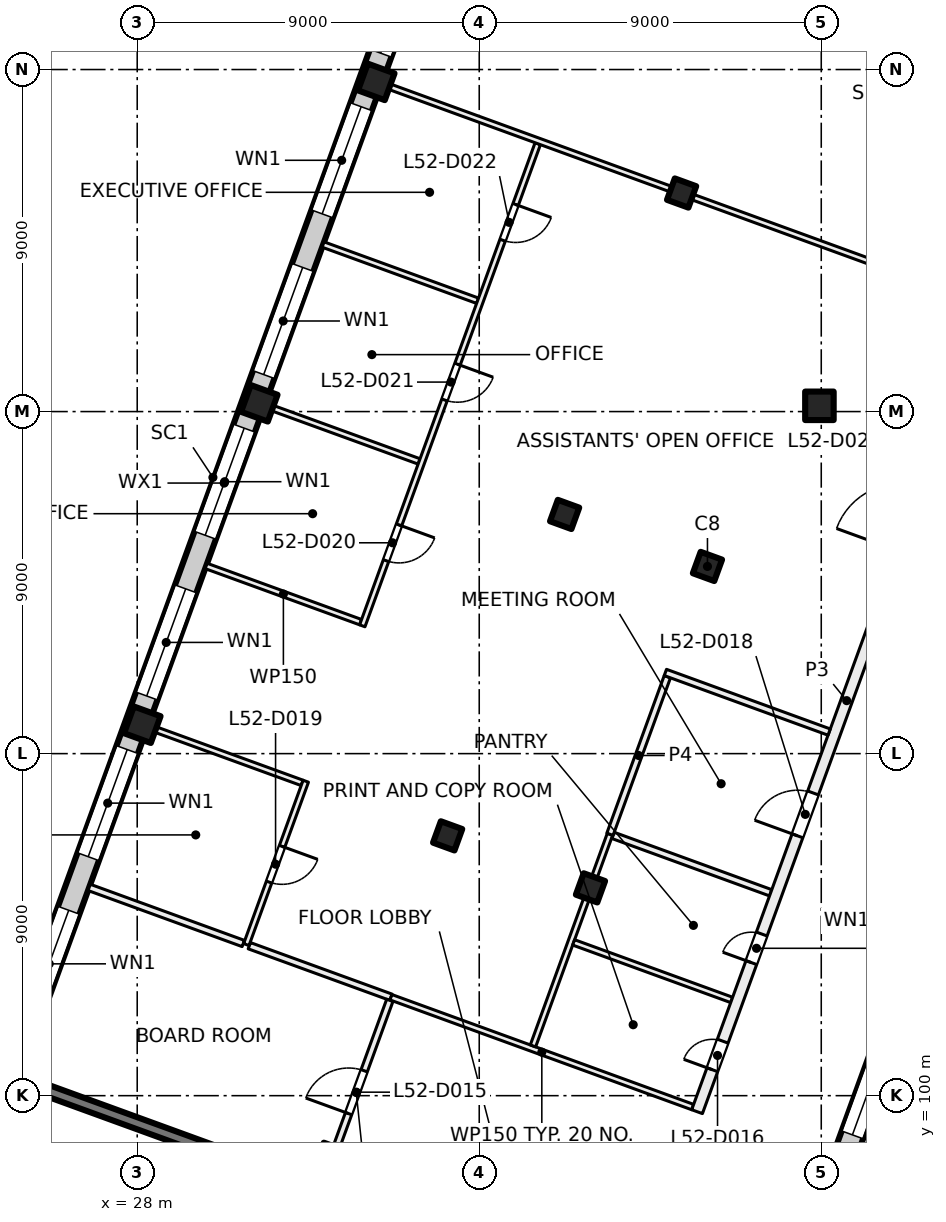
"""IFC4 building model, lengths in metres.
Left out: names, types, materials, properties, quantities, classifications, styles, units other than length and angle.
Written with IfcOpenShell. Run it as: python <this file> out.ifc"""

import sys

from ifc_helpers import new_model, si_unit, direction, frame, frame_2d, origin, origin_2d, place, context, subcontext, project, spatial, rectangle, extrude, element, fill, save


model = new_model("IFC4")
c1 = context("Model", 3, precision=1e-05, world=origin(), true_north=direction((0.0, 1.0)))
c2 = subcontext(c1, "Body", "Model", "MODEL_VIEW")
j1 = project(units=[si_unit("LENGTHUNIT", "METRE"), si_unit("PLANEANGLEUNIT", "RADIAN")], contexts=[c1])
p1 = place(None, origin())
s1 = spatial("IfcSite", under=j1, at=p1, CompositionType="ELEMENT")
p2 = place(p1, origin())
s2 = spatial("IfcBuilding", under=s1, at=p2, CompositionType="ELEMENT")
p3 = place(p2, frame((0.0, 0.0, 220.0)))
s3 = spatial("IfcBuildingStorey", under=s2, at=p3, CompositionType="ELEMENT", Elevation=220.0)
p4 = place(p3, frame((45.952, 118.152, 0.0), z_axis=(0.0, 0.0, 1.0), x_axis=(1.0, 0.0, 0.0)))
e1 = element("IfcColumn", 1, at=p4, inside=s3, PredefinedType="COLUMN", context=c2, shape_type="SweptSolid", body=[
    extrude(rectangle(XDim=0.75, YDim=0.75, at=origin_2d()), origin(), (0.0, 0.0, 1.0), 4.0),
])
for number, where, z_axis, x_axis in (
    (2, (43.006, 113.925, 0.0), (0.0, 0.0, 1.0), (-0.342, -0.94, 0.0)),
    (3, (39.927, 105.468, 0.0), (0.0, 0.0, 1.0), (-0.342, -0.94, 0.0)),
    (4, (42.325, 123.751, 0.0), (0.0, 0.0, 1.0), (-0.342, -0.94, 0.0)),
    (5, (39.247, 115.293, 0.0), (0.0, 0.0, 1.0), (-0.342, -0.94, 0.0)),
    (6, (36.169, 106.836, 0.0), (0.0, 0.0, 1.0), (-0.342, -0.94, 0.0)),
):
    element("IfcColumn", number, at=place(p3, frame(where, z_axis=z_axis, x_axis=x_axis)), inside=s3, PredefinedType="COLUMN", context=c2, shape_type="SweptSolid", body=[
        extrude(rectangle(XDim=0.6, YDim=0.6, at=origin_2d()), origin(), (0.0, 0.0, 1.0), 4.0),
    ])
for number, where, z_axis, x_axis in (
    (7, (34.291, 126.675, 0.0), (0.0, 0.0, 1.0), (-0.342, -0.94, 0.0)),
    (8, (31.212, 118.218, 0.0), (0.0, 0.0, 1.0), (-0.342, -0.94, 0.0)),
    (9, (28.134, 109.76, 0.0), (0.0, 0.0, 1.0), (-0.342, -0.94, 0.0)),
):
    element("IfcColumn", number, at=place(p3, frame(where, z_axis=z_axis, x_axis=x_axis)), inside=s3, PredefinedType="COLUMN", context=c2, shape_type="SweptSolid", body=[
        extrude(rectangle(XDim=0.75, YDim=0.75, at=origin_2d()), origin(), (0.0, 0.0, 1.0), 4.0),
    ])
p5 = place(p3, frame((32.971, 97.465, 0.0), z_axis=(0.0, 0.0, 1.0), x_axis=(-0.939695066972, 0.34201342241, 0.0)))
e10 = element("IfcWall", 10, at=p5, inside=s3, PredefinedType="SHEAR", context=c2, shape_type="SweptSolid", body=[
    extrude(rectangle(XDim=8.7, YDim=0.3, at=frame_2d((4.35, 0.0))), origin(), (0.0, 0.0, 1.0), 4.0),
])
p6 = place(p3, frame((52.212, 113.783, 0.0), z_axis=(0.0, 0.0, 1.0), x_axis=(-0.34202521188, -0.939690775968, 0.0)))
e11 = element("IfcWall", 11, at=p6, inside=s3, PredefinedType="SOLIDWALL", context=c2, shape_type="SweptSolid", body=[
    extrude(rectangle(XDim=21.745, YDim=0.6, at=frame_2d((10.873, 0.0))), origin(), (0.0, 0.0, 1.0), 3.625),
])
p7 = place(p6, frame((3.765, 0.0, 0.9)))
e12 = element("IfcOpeningElement", 12, at=p7, cuts=e11, PredefinedType="OPENING", context=c2, shape_type="SweptSolid", body=[
    extrude(rectangle(XDim=3.0, YDim=2.4, at=frame_2d((1.5, 1.2))), frame((0.0, 0.31, 0.0), z_axis=(0.0, -1.0, 0.0), x_axis=(1.0, 0.0, 0.0)), (0.0, 0.0, 1.0), 0.62),
])
p8 = place(p6, frame((8.265, 0.0, 0.9)))
e13 = element("IfcOpeningElement", 13, at=p8, cuts=e11, PredefinedType="OPENING", context=c2, shape_type="SweptSolid", body=[
    extrude(rectangle(XDim=3.0, YDim=2.4, at=frame_2d((1.5, 1.2))), frame((0.0, 0.31, 0.0), z_axis=(0.0, -1.0, 0.0), x_axis=(1.0, 0.0, 0.0)), (0.0, 0.0, 1.0), 0.62),
])
p9 = place(p6, frame((12.765, 0.0, 0.9)))
e14 = element("IfcOpeningElement", 14, at=p9, cuts=e11, PredefinedType="OPENING", context=c2, shape_type="SweptSolid", body=[
    extrude(rectangle(XDim=3.0, YDim=2.4, at=frame_2d((1.5, 1.2))), frame((0.0, 0.31, 0.0), z_axis=(0.0, -1.0, 0.0), x_axis=(1.0, 0.0, 0.0)), (0.0, 0.0, 1.0), 0.62),
])
p10 = place(p6, frame((17.265, 0.0, 0.9)))
e15 = element("IfcOpeningElement", 15, at=p10, cuts=e11, PredefinedType="OPENING", context=c2, shape_type="SweptSolid", body=[
    extrude(rectangle(XDim=3.0, YDim=2.4, at=frame_2d((1.5, 1.2))), frame((0.0, 0.31, 0.0), z_axis=(0.0, -1.0, 0.0), x_axis=(1.0, 0.0, 0.0)), (0.0, 0.0, 1.0), 0.62),
])
p11 = place(p3, frame((24.666, 100.669, 0.0), z_axis=(0.0, 0.0, 1.0), x_axis=(0.34201964167, 0.939692803373, 0.0)))
e16 = element("IfcWall", 16, at=p11, inside=s3, PredefinedType="SOLIDWALL", context=c2, shape_type="SweptSolid", body=[
    extrude(rectangle(XDim=32.884, YDim=0.6, at=frame_2d((16.442, 0.0))), origin(), (0.0, 0.0, 1.0), 3.625),
])
p12 = place(p11, frame((1.48, 0.0, 0.9)))
e17 = element("IfcOpeningElement", 17, at=p12, cuts=e16, PredefinedType="OPENING", context=c2, shape_type="SweptSolid", body=[
    extrude(rectangle(XDim=3.0, YDim=2.4, at=frame_2d((1.5, 1.2))), frame((0.0, 0.31, 0.0), z_axis=(0.0, -1.0, 0.0), x_axis=(1.0, 0.0, 0.0)), (0.0, 0.0, 1.0), 0.62),
])
p13 = place(p11, frame((5.98, 0.0, 0.9)))
e18 = element("IfcOpeningElement", 18, at=p13, cuts=e16, PredefinedType="OPENING", context=c2, shape_type="SweptSolid", body=[
    extrude(rectangle(XDim=3.0, YDim=2.4, at=frame_2d((1.5, 1.2))), frame((0.0, 0.31, 0.0), z_axis=(0.0, -1.0, 0.0), x_axis=(1.0, 0.0, 0.0)), (0.0, 0.0, 1.0), 0.62),
])
p14 = place(p11, frame((10.48, 0.0, 0.9)))
e19 = element("IfcOpeningElement", 19, at=p14, cuts=e16, PredefinedType="OPENING", context=c2, shape_type="SweptSolid", body=[
    extrude(rectangle(XDim=3.0, YDim=2.4, at=frame_2d((1.5, 1.2))), frame((0.0, 0.31, 0.0), z_axis=(0.0, -1.0, 0.0), x_axis=(1.0, 0.0, 0.0)), (0.0, 0.0, 1.0), 0.62),
])
p15 = place(p11, frame((14.98, 0.0, 0.9)))
e20 = element("IfcOpeningElement", 20, at=p15, cuts=e16, PredefinedType="OPENING", context=c2, shape_type="SweptSolid", body=[
    extrude(rectangle(XDim=3.0, YDim=2.4, at=frame_2d((1.5, 1.2))), frame((0.0, 0.31, 0.0), z_axis=(0.0, -1.0, 0.0), x_axis=(1.0, 0.0, 0.0)), (0.0, 0.0, 1.0), 0.62),
])
p16 = place(p11, frame((19.48, 0.0, 0.9)))
e21 = element("IfcOpeningElement", 21, at=p16, cuts=e16, PredefinedType="OPENING", context=c2, shape_type="SweptSolid", body=[
    extrude(rectangle(XDim=3.0, YDim=2.4, at=frame_2d((1.5, 1.2))), frame((0.0, 0.31, 0.0), z_axis=(0.0, -1.0, 0.0), x_axis=(1.0, 0.0, 0.0)), (0.0, 0.0, 1.0), 0.62),
])
p17 = place(p11, frame((23.98, 0.0, 0.9)))
e22 = element("IfcOpeningElement", 22, at=p17, cuts=e16, PredefinedType="OPENING", context=c2, shape_type="SweptSolid", body=[
    extrude(rectangle(XDim=3.0, YDim=2.4, at=frame_2d((1.5, 1.2))), frame((0.0, 0.31, 0.0), z_axis=(0.0, -1.0, 0.0), x_axis=(1.0, 0.0, 0.0)), (0.0, 0.0, 1.0), 0.62),
])
p18 = place(p11, frame((28.48, 0.0, 0.9)))
e23 = element("IfcOpeningElement", 23, at=p18, cuts=e16, PredefinedType="OPENING", context=c2, shape_type="SweptSolid", body=[
    extrude(rectangle(XDim=3.0, YDim=2.4, at=frame_2d((1.5, 1.2))), frame((0.0, 0.31, 0.0), z_axis=(0.0, -1.0, 0.0), x_axis=(1.0, 0.0, 0.0)), (0.0, 0.0, 1.0), 0.62),
])
p19 = place(p3, frame((26.736, 105.48, 0.0), z_axis=(0.0, 0.0, 1.0), x_axis=(0.939677739056, -0.342061027776, 0.0)))
e24 = element("IfcWall", 24, at=p19, inside=s3, PredefinedType="PARTITIONING", context=c2, shape_type="SweptSolid", body=[
    extrude(rectangle(XDim=4.315, YDim=0.175, at=frame_2d((2.158, 0.0))), origin(), (0.0, 0.0, 1.0), 3.625),
])
p20 = place(p3, frame((28.275, 109.709, 0.0), z_axis=(0.0, 0.0, 1.0), x_axis=(0.939737385516, -0.341897128188, 0.0)))
e25 = element("IfcWall", 25, at=p20, inside=s3, PredefinedType="PARTITIONING", context=c2, shape_type="SweptSolid", body=[
    extrude(rectangle(XDim=4.326, YDim=0.15, at=frame_2d((2.163, 0.0))), origin(), (0.0, 0.0, 1.0), 3.625),
])
p21 = place(p3, frame((30.95, 103.946, 0.0), z_axis=(0.0, 0.0, 1.0), x_axis=(0.939739492658, -0.341891336449, 0.0)))
e26 = element("IfcWall", 26, at=p21, inside=s3, PredefinedType="PARTITIONING", context=c2, shape_type="SweptSolid", body=[
    extrude(rectangle(XDim=3.966, YDim=0.175, at=frame_2d((1.983, 0.0))), origin(), (0.0, 0.0, 1.0), 3.625),
])
p22 = place(p3, frame((31.353, 118.166, 0.0), z_axis=(0.0, 0.0, 1.0), x_axis=(0.939803311208, -0.341715870634, 0.0)))
e27 = element("IfcWall", 27, at=p22, inside=s3, PredefinedType="PARTITIONING", context=c2, shape_type="SweptSolid", body=[
    extrude(rectangle(XDim=4.325, YDim=0.15, at=frame_2d((2.163, 0.0))), origin(), (0.0, 0.0, 1.0), 3.625),
])
p23 = place(p3, frame((32.436, 108.274, 0.0), z_axis=(0.0, 0.0, 1.0), x_axis=(-0.342145890874, -0.939646842893, 0.0)))
e28 = element("IfcWall", 28, at=p23, inside=s3, PredefinedType="PARTITIONING", context=c2, shape_type="SweptSolid", body=[
    extrude(rectangle(XDim=4.574, YDim=0.15, at=frame_2d((2.287, 0.0))), origin(), (0.0, 0.0, 1.0), 3.625),
])
p24 = place(p23, frame((1.824, 0.0, 0.0)))
e29 = element("IfcOpeningElement", 29, at=p24, cuts=e28, PredefinedType="OPENING", context=c2, shape_type="SweptSolid", body=[
    extrude(rectangle(XDim=1.0, YDim=2.1, at=frame_2d((0.5, 1.05))), frame((0.0, 0.085, 0.0), z_axis=(0.0, -1.0, 0.0), x_axis=(1.0, 0.0, 0.0)), (0.0, 0.0, 1.0), 0.17),
])
for number, where, z_axis, x_axis in (
    (30, (32.892, 122.395, 0.0), (0.0, 0.0, 1.0), (0.94, -0.342, 0.0)),
    (31, (33.879, 112.459, 0.0), (0.0, 0.0, 1.0), (-0.94, 0.342, 0.0)),
):
    element("IfcWall", number, at=place(p3, frame(where, z_axis=z_axis, x_axis=x_axis)), inside=s3, PredefinedType="PARTITIONING", context=c2, shape_type="SweptSolid", body=[
        extrude(rectangle(XDim=4.326, YDim=0.15, at=frame_2d((2.163, 0.0))), origin(), (0.0, 0.0, 1.0), 3.625),
    ])
p25 = place(p3, frame((38.54, 125.049, 0.0), z_axis=(0.0, 0.0, 1.0), x_axis=(-0.341994252555, -0.939702043852, 0.0)))
e32 = element("IfcWall", 32, at=p25, inside=s3, PredefinedType="PARTITIONING", context=c2, shape_type="SweptSolid", body=[
    extrude(rectangle(XDim=13.5, YDim=0.15, at=frame_2d((6.75, 0.0))), origin(), (0.0, 0.0, 1.0), 3.625),
])
p26 = place(p25, frame((10.675, 0.0, 0.0)))
e33 = element("IfcOpeningElement", 33, at=p26, cuts=e32, PredefinedType="OPENING", context=c2, shape_type="SweptSolid", body=[
    extrude(rectangle(XDim=1.0, YDim=2.1, at=frame_2d((0.5, 1.05))), frame((0.0, 0.085, 0.0), z_axis=(0.0, -1.0, 0.0), x_axis=(1.0, 0.0, 0.0)), (0.0, 0.0, 1.0), 0.17),
])
p27 = place(p25, frame((6.176, 0.0, 0.0)))
e34 = element("IfcOpeningElement", 34, at=p27, cuts=e32, PredefinedType="OPENING", context=c2, shape_type="SweptSolid", body=[
    extrude(rectangle(XDim=1.0, YDim=2.1, at=frame_2d((0.5, 1.05))), frame((0.0, 0.085, 0.0), z_axis=(0.0, -1.0, 0.0), x_axis=(1.0, 0.0, 0.0)), (0.0, 0.0, 1.0), 0.17),
])
p28 = place(p25, frame((1.703, 0.0, 0.0)))
e35 = element("IfcOpeningElement", 35, at=p28, cuts=e32, PredefinedType="OPENING", context=c2, shape_type="SweptSolid", body=[
    extrude(rectangle(XDim=1.0, YDim=2.1, at=frame_2d((0.5, 1.05))), frame((0.0, 0.085, 0.0), z_axis=(0.0, -1.0, 0.0), x_axis=(1.0, 0.0, 0.0)), (0.0, 0.0, 1.0), 0.17),
])
p29 = place(p3, frame((34.432, 126.624, 0.0), z_axis=(0.0, 0.0, 1.0), x_axis=(0.939664702396, -0.342096838733, 0.0)))
e36 = element("IfcWall", 36, at=p29, inside=s3, PredefinedType="PARTITIONING", context=c2, shape_type="SweptSolid", body=[
    extrude(rectangle(XDim=16.899, YDim=0.15, at=frame_2d((8.449, 0.0))), origin(), (0.0, 0.0, 1.0), 3.625),
])
p30 = place(p3, frame((32.881, 97.657, 0.0), z_axis=(0.0, 0.0, 1.0), x_axis=(0.342058204353, 0.939678766832, 0.0)))
e37 = element("IfcWall", 37, at=p30, inside=s3, PredefinedType="PARTITIONING", context=c2, shape_type="SweptSolid", body=[
    extrude(rectangle(XDim=5.163, YDim=0.175, at=frame_2d((2.581, 0.0))), origin(), (0.0, 0.0, 1.0), 3.625),
])
p31 = place(p30, frame((1.991, 0.0, 0.0)))
e38 = element("IfcOpeningElement", 38, at=p31, cuts=e37, PredefinedType="OPENING", context=c2, shape_type="SweptSolid", body=[
    extrude(rectangle(XDim=1.2, YDim=2.1, at=frame_2d((0.6, 1.05))), frame((0.0, 0.097, 0.0), z_axis=(0.0, -1.0, 0.0), x_axis=(1.0, 0.0, 0.0)), (0.0, 0.0, 1.0), 0.195),
])
p32 = place(p3, frame((34.677, 102.59, 0.0), z_axis=(0.0, 0.0, 1.0), x_axis=(0.939683705252, -0.342044637561, 0.0)))
e39 = element("IfcWall", 39, at=p32, inside=s3, PredefinedType="PARTITIONING", context=c2, shape_type="SweptSolid", body=[
    extrude(rectangle(XDim=8.45, YDim=0.15, at=frame_2d((4.225, 0.0))), origin(), (0.0, 0.0, 1.0), 3.625),
])
p33 = place(p3, frame((38.414, 101.309, 0.0), z_axis=(0.0, 0.0, 1.0), x_axis=(0.34186876189, 0.939747705315, 0.0)))
e40 = element("IfcWall", 40, at=p33, inside=s3, PredefinedType="PARTITIONING", context=c2, shape_type="SweptSolid", body=[
    extrude(rectangle(XDim=5.926, YDim=0.15, at=frame_2d((2.963, 0.0))), origin(), (0.0, 0.0, 1.0), 3.625),
])
p34 = place(p3, frame((39.484, 104.033, 0.0), z_axis=(0.0, 0.0, 1.0), x_axis=(0.939685474739, -0.342039776289, 0.0)))
e41 = element("IfcWall", 41, at=p34, inside=s3, PredefinedType="PARTITIONING", context=c2, shape_type="SweptSolid", body=[
    extrude(rectangle(XDim=4.426, YDim=0.15, at=frame_2d((2.213, 0.0))), origin(), (0.0, 0.0, 1.0), 3.625),
])
p35 = place(p3, frame((40.522, 106.848, 0.0), z_axis=(0.0, 0.0, 1.0), x_axis=(0.939646357962, -0.342147222654, 0.0)))
e42 = element("IfcWall", 42, at=p35, inside=s3, PredefinedType="PARTITIONING", context=c2, shape_type="SweptSolid", body=[
    extrude(rectangle(XDim=4.413, YDim=0.175, at=frame_2d((2.207, 0.0))), origin(), (0.0, 0.0, 1.0), 3.625),
])
p36 = place(p3, frame((41.95, 111.024, 0.0), z_axis=(0.0, 0.0, 1.0), x_axis=(-0.342218375959, -0.939620446327, 0.0)))
e43 = element("IfcWall", 43, at=p36, inside=s3, PredefinedType="PARTITIONING", context=c2, shape_type="SweptSolid", body=[
    extrude(rectangle(XDim=4.412, YDim=0.175, at=frame_2d((2.206, 0.0))), origin(), (0.0, 0.0, 1.0), 3.625),
])
p37 = place(p3, frame((42.732, 99.579, 0.0), z_axis=(0.0, 0.0, 1.0), x_axis=(0.342036000593, 0.939686849061, 0.0)))
e44 = element("IfcWall", 44, at=p37, inside=s3, PredefinedType="PARTITIONING", context=c2, shape_type="SweptSolid", body=[
    extrude(rectangle(XDim=23.018, YDim=0.3, at=frame_2d((11.509, 0.0))), origin(), (0.0, 0.0, 1.0), 3.625),
])
p38 = place(p37, frame((1.175, 0.0, 0.0)))
e45 = element("IfcOpeningElement", 45, at=p38, cuts=e44, PredefinedType="OPENING", context=c2, shape_type="SweptSolid", body=[
    extrude(rectangle(XDim=0.8, YDim=2.1, at=frame_2d((0.4, 1.05))), frame((0.0, 0.16, 0.0), z_axis=(0.0, -1.0, 0.0), x_axis=(1.0, 0.0, 0.0)), (0.0, 0.0, 1.0), 0.32),
])
p39 = place(p37, frame((4.175, 0.0, 0.0)))
e46 = element("IfcOpeningElement", 46, at=p39, cuts=e44, PredefinedType="OPENING", context=c2, shape_type="SweptSolid", body=[
    extrude(rectangle(XDim=0.8, YDim=2.1, at=frame_2d((0.4, 1.05))), frame((0.0, 0.16, 0.0), z_axis=(0.0, -1.0, 0.0), x_axis=(1.0, 0.0, 0.0)), (0.0, 0.0, 1.0), 0.32),
])
p40 = place(p37, frame((7.725, 0.0, 0.0)))
e47 = element("IfcOpeningElement", 47, at=p40, cuts=e44, PredefinedType="OPENING", context=c2, shape_type="SweptSolid", body=[
    extrude(rectangle(XDim=1.2, YDim=2.1, at=frame_2d((0.6, 1.05))), frame((0.0, 0.16, 0.0), z_axis=(0.0, -1.0, 0.0), x_axis=(1.0, 0.0, 0.0)), (0.0, 0.0, 1.0), 0.32),
])
p41 = place(p37, frame((15.675, 0.0, 0.0)))
e48 = element("IfcOpeningElement", 48, at=p41, cuts=e44, PredefinedType="OPENING", context=c2, shape_type="SweptSolid", body=[
    extrude(rectangle(XDim=1.8, YDim=2.1, at=frame_2d((0.9, 1.05))), frame((0.0, 0.16, 0.0), z_axis=(0.0, -1.0, 0.0), x_axis=(1.0, 0.0, 0.0)), (0.0, 0.0, 1.0), 0.32),
])
p42 = place(p3, frame((46.208, 109.567, 0.0), z_axis=(0.0, 0.0, 1.0), x_axis=(-0.939667480086, 0.342089208934, 0.0)))
e49 = element("IfcWall", 49, at=p42, inside=s3, PredefinedType="PARTITIONING", context=c2, shape_type="SweptSolid", body=[
    extrude(rectangle(XDim=4.587, YDim=0.175, at=frame_2d((2.293, 0.0))), origin(), (0.0, 0.0, 1.0), 3.625),
])
p43 = place(p9, origin())
e50 = element("IfcWindow", 50, at=p43, inside=s3, PartitioningType="SINGLE_PANEL", PredefinedType="WINDOW", context=c2, shape_type="SweptSolid", body=[
    extrude(rectangle(XDim=3.0, YDim=2.4, at=frame_2d((1.5, 1.2))), frame((0.0, 0.03, 0.0), z_axis=(0.0, -1.0, 0.0), x_axis=(1.0, 0.0, 0.0)), (0.0, 0.0, 1.0), 0.06),
])
fill(e14, e50)
p44 = place(p12, origin())
e51 = element("IfcWindow", 51, at=p44, inside=s3, PartitioningType="SINGLE_PANEL", PredefinedType="WINDOW", context=c2, shape_type="SweptSolid", body=[
    extrude(rectangle(XDim=3.0, YDim=2.4, at=frame_2d((1.5, 1.2))), frame((0.0, 0.03, 0.0), z_axis=(0.0, -1.0, 0.0), x_axis=(1.0, 0.0, 0.0)), (0.0, 0.0, 1.0), 0.06),
])
fill(e17, e51)
p45 = place(p13, origin())
e52 = element("IfcWindow", 52, at=p45, inside=s3, PartitioningType="SINGLE_PANEL", PredefinedType="WINDOW", context=c2, shape_type="SweptSolid", body=[
    extrude(rectangle(XDim=3.0, YDim=2.4, at=frame_2d((1.5, 1.2))), frame((0.0, 0.03, 0.0), z_axis=(0.0, -1.0, 0.0), x_axis=(1.0, 0.0, 0.0)), (0.0, 0.0, 1.0), 0.06),
])
fill(e18, e52)
p46 = place(p14, origin())
e53 = element("IfcWindow", 53, at=p46, inside=s3, PartitioningType="SINGLE_PANEL", PredefinedType="WINDOW", context=c2, shape_type="SweptSolid", body=[
    extrude(rectangle(XDim=3.0, YDim=2.4, at=frame_2d((1.5, 1.2))), frame((0.0, 0.03, 0.0), z_axis=(0.0, -1.0, 0.0), x_axis=(1.0, 0.0, 0.0)), (0.0, 0.0, 1.0), 0.06),
])
fill(e19, e53)
p47 = place(p15, origin())
e54 = element("IfcWindow", 54, at=p47, inside=s3, PartitioningType="SINGLE_PANEL", PredefinedType="WINDOW", context=c2, shape_type="SweptSolid", body=[
    extrude(rectangle(XDim=3.0, YDim=2.4, at=frame_2d((1.5, 1.2))), frame((0.0, 0.03, 0.0), z_axis=(0.0, -1.0, 0.0), x_axis=(1.0, 0.0, 0.0)), (0.0, 0.0, 1.0), 0.06),
])
fill(e20, e54)
p48 = place(p16, origin())
e55 = element("IfcWindow", 55, at=p48, inside=s3, PartitioningType="SINGLE_PANEL", PredefinedType="WINDOW", context=c2, shape_type="SweptSolid", body=[
    extrude(rectangle(XDim=3.0, YDim=2.4, at=frame_2d((1.5, 1.2))), frame((0.0, 0.03, 0.0), z_axis=(0.0, -1.0, 0.0), x_axis=(1.0, 0.0, 0.0)), (0.0, 0.0, 1.0), 0.06),
])
fill(e21, e55)
p49 = place(p17, origin())
e56 = element("IfcWindow", 56, at=p49, inside=s3, PartitioningType="SINGLE_PANEL", PredefinedType="WINDOW", context=c2, shape_type="SweptSolid", body=[
    extrude(rectangle(XDim=3.0, YDim=2.4, at=frame_2d((1.5, 1.2))), frame((0.0, 0.03, 0.0), z_axis=(0.0, -1.0, 0.0), x_axis=(1.0, 0.0, 0.0)), (0.0, 0.0, 1.0), 0.06),
])
fill(e22, e56)
p50 = place(p18, origin())
e57 = element("IfcWindow", 57, at=p50, inside=s3, PartitioningType="SINGLE_PANEL", PredefinedType="WINDOW", context=c2, shape_type="SweptSolid", body=[
    extrude(rectangle(XDim=3.0, YDim=2.4, at=frame_2d((1.5, 1.2))), frame((0.0, 0.03, 0.0), z_axis=(0.0, -1.0, 0.0), x_axis=(1.0, 0.0, 0.0)), (0.0, 0.0, 1.0), 0.06),
])
fill(e23, e57)
p51 = place(p31, origin())
e58 = element("IfcDoor", 58, at=p51, inside=s3, OperationType="DOUBLE_DOOR_SINGLE_SWING", PredefinedType="DOOR", context=c2, shape_type="SweptSolid", body=[
    extrude(rectangle(XDim=1.2, YDim=2.1, at=frame_2d((0.6, 1.05))), frame((0.0, 0.025, 0.0), z_axis=(0.0, -1.0, 0.0), x_axis=(1.0, 0.0, 0.0)), (0.0, 0.0, 1.0), 0.05),
])
fill(e38, e58)
p52 = place(p38, origin())
e59 = element("IfcDoor", 59, at=p52, inside=s3, OperationType="SINGLE_SWING_RIGHT", PredefinedType="DOOR", context=c2, shape_type="SweptSolid", body=[
    extrude(rectangle(XDim=0.8, YDim=2.1, at=frame_2d((0.4, 1.05))), frame((0.0, 0.025, 0.0), z_axis=(0.0, -1.0, 0.0), x_axis=(1.0, 0.0, 0.0)), (0.0, 0.0, 1.0), 0.05),
])
fill(e45, e59)
p53 = place(p39, origin())
e60 = element("IfcDoor", 60, at=p53, inside=s3, OperationType="SINGLE_SWING_LEFT", PredefinedType="DOOR", context=c2, shape_type="SweptSolid", body=[
    extrude(rectangle(XDim=0.8, YDim=2.1, at=frame_2d((0.4, 1.05))), frame((0.0, 0.025, 0.0), z_axis=(0.0, -1.0, 0.0), x_axis=(1.0, 0.0, 0.0)), (0.0, 0.0, 1.0), 0.05),
])
fill(e46, e60)
p54 = place(p40, origin())
e61 = element("IfcDoor", 61, at=p54, inside=s3, OperationType="DOUBLE_DOOR_SINGLE_SWING", PredefinedType="DOOR", context=c2, shape_type="SweptSolid", body=[
    extrude(rectangle(XDim=1.2, YDim=2.1, at=frame_2d((0.6, 1.05))), frame((0.0, 0.025, 0.0), z_axis=(0.0, -1.0, 0.0), x_axis=(1.0, 0.0, 0.0)), (0.0, 0.0, 1.0), 0.05),
])
fill(e47, e61)
p55 = place(p24, origin())
e62 = element("IfcDoor", 62, at=p55, inside=s3, OperationType="SINGLE_SWING_LEFT", PredefinedType="DOOR", context=c2, shape_type="SweptSolid", body=[
    extrude(rectangle(XDim=1.0, YDim=2.1, at=frame_2d((0.5, 1.05))), frame((0.0, 0.025, 0.0), z_axis=(0.0, -1.0, 0.0), x_axis=(1.0, 0.0, 0.0)), (0.0, 0.0, 1.0), 0.05),
])
fill(e29, e62)
p56 = place(p26, origin())
e63 = element("IfcDoor", 63, at=p56, inside=s3, OperationType="SINGLE_SWING_LEFT", PredefinedType="DOOR", context=c2, shape_type="SweptSolid", body=[
    extrude(rectangle(XDim=1.0, YDim=2.1, at=frame_2d((0.5, 1.05))), frame((0.0, 0.025, 0.0), z_axis=(0.0, -1.0, 0.0), x_axis=(1.0, 0.0, 0.0)), (0.0, 0.0, 1.0), 0.05),
])
fill(e33, e63)
p57 = place(p27, origin())
e64 = element("IfcDoor", 64, at=p57, inside=s3, OperationType="SINGLE_SWING_LEFT", PredefinedType="DOOR", context=c2, shape_type="SweptSolid", body=[
    extrude(rectangle(XDim=1.0, YDim=2.1, at=frame_2d((0.5, 1.05))), frame((0.0, 0.025, 0.0), z_axis=(0.0, -1.0, 0.0), x_axis=(1.0, 0.0, 0.0)), (0.0, 0.0, 1.0), 0.05),
])
fill(e34, e64)
p58 = place(p28, origin())
e65 = element("IfcDoor", 65, at=p58, inside=s3, OperationType="SINGLE_SWING_LEFT", PredefinedType="DOOR", context=c2, shape_type="SweptSolid", body=[
    extrude(rectangle(XDim=1.0, YDim=2.1, at=frame_2d((0.5, 1.05))), frame((0.0, 0.025, 0.0), z_axis=(0.0, -1.0, 0.0), x_axis=(1.0, 0.0, 0.0)), (0.0, 0.0, 1.0), 0.05),
])
fill(e35, e65)
save(model, sys.argv[1])
